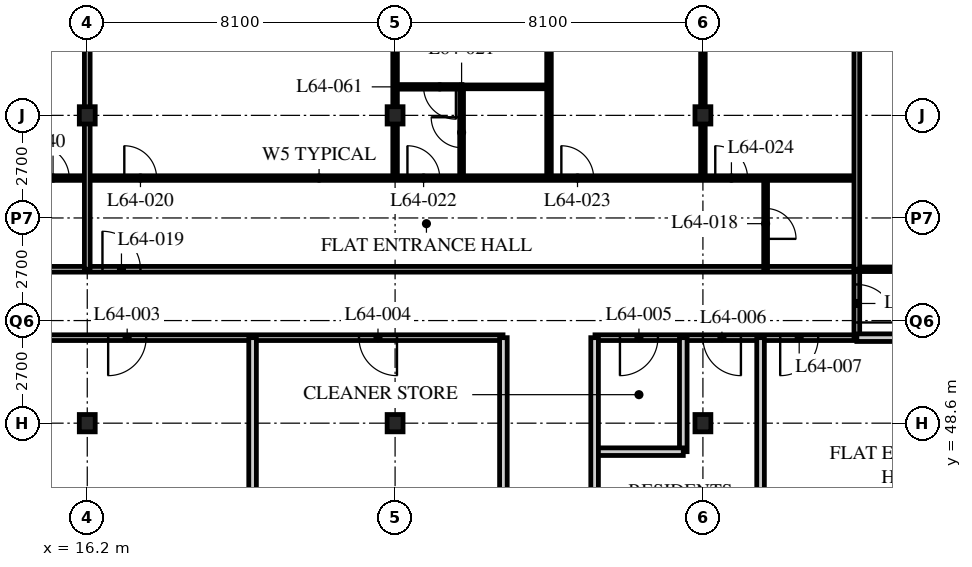
"""IFC4 building model, lengths in metres.
Left out: names, types, materials, properties, quantities, classifications, styles, units other than length and angle.
Written with IfcOpenShell. Run it as: python <this file> out.ifc"""

import sys

from ifc_helpers import new_model, si_unit, direction, frame, frame_2d, origin, origin_2d, place, context, subcontext, project, spatial, rectangle, i_section, extrude, element, fill, save


model = new_model("IFC4")
c1 = context("Model", 3, precision=1e-05, world=origin(), true_north=direction((0.0, 1.0)))
c2 = subcontext(c1, "Body", "Model", "MODEL_VIEW")
j1 = project(units=[si_unit("LENGTHUNIT", "METRE"), si_unit("PLANEANGLEUNIT", "RADIAN")], contexts=[c1])
p1 = place(None, origin())
s1 = spatial("IfcSite", under=j1, at=p1, CompositionType="ELEMENT")
p2 = place(p1, origin())
s2 = spatial("IfcBuilding", under=s1, at=p2, CompositionType="ELEMENT")
p3 = place(p2, frame((0.0, 0.0, 250.2)))
s3 = spatial("IfcBuildingStorey", under=s2, at=p3, CompositionType="ELEMENT", Elevation=250.2)
for number, where, z_axis, x_axis in (
    (1, (16.2, 48.6, 0.0), (0.0, 0.0, 1.0), (1.0, 0.0, 0.0)),
    (2, (16.2, 56.7, 0.0), (0.0, 0.0, 1.0), (1.0, 0.0, 0.0)),
    (3, (24.3, 48.6, 0.0), (0.0, 0.0, 1.0), (1.0, 0.0, 0.0)),
    (4, (24.3, 56.7, 0.0), (0.0, 0.0, 1.0), (1.0, 0.0, 0.0)),
    (5, (32.4, 48.6, 0.0), (0.0, 0.0, 1.0), (1.0, 0.0, 0.0)),
    (6, (32.4, 56.7, 0.0), (0.0, 0.0, 1.0), (1.0, 0.0, 0.0)),
):
    element("IfcColumn", number, at=place(p3, frame(where, z_axis=z_axis, x_axis=x_axis)), inside=s3, PredefinedType="COLUMN", context=c2, shape_type="SweptSolid", body=[
        extrude(i_section(OverallWidth=0.418, OverallDepth=0.456, WebThickness=0.042, FlangeThickness=0.067, FilletRadius=0.015, at=origin_2d()), origin(), (0.0, 0.0, 1.0), 3.9),
    ])
p4 = place(p3, frame((12.15, 52.65, 0.0), z_axis=(0.0, 0.0, 1.0), x_axis=(1.0, 0.0, 0.0)))
e7 = element("IfcWall", 7, at=p4, inside=s3, PredefinedType="PARTITIONING", context=c2, shape_type="SweptSolid", body=[
    extrude(rectangle(XDim=24.3, YDim=0.15, at=frame_2d((12.15, 0.0))), origin(), (0.0, 0.0, 1.0), 3.69),
])
p5 = place(p4, frame((4.45, 0.0, 0.0)))
e8 = element("IfcOpeningElement", 8, at=p5, cuts=e7, PredefinedType="OPENING", context=c2, shape_type="SweptSolid", body=[
    extrude(rectangle(XDim=1.0, YDim=2.1, at=frame_2d((0.5, 1.05))), frame((0.0, 0.085, 0.0), z_axis=(0.0, -1.0, 0.0), x_axis=(1.0, 0.0, 0.0)), (0.0, 0.0, 1.0), 0.17),
])
p6 = place(p4, frame((1.525, 0.0, 0.0)))
e9 = element("IfcOpeningElement", 9, at=p6, cuts=e7, PredefinedType="OPENING", context=c2, shape_type="SweptSolid", body=[
    extrude(rectangle(XDim=1.0, YDim=2.1, at=frame_2d((0.5, 1.05))), frame((0.0, 0.085, 0.0), z_axis=(0.0, -1.0, 0.0), x_axis=(1.0, 0.0, 0.0)), (0.0, 0.0, 1.0), 0.17),
])
p7 = place(p3, frame((13.95, 50.85, 0.0), z_axis=(0.0, 0.0, 1.0), x_axis=(1.0, 0.0, 0.0)))
e10 = element("IfcWall", 10, at=p7, inside=s3, PredefinedType="PARTITIONING", context=c2, shape_type="SweptSolid", body=[
    extrude(rectangle(XDim=13.19, YDim=0.15, at=frame_2d((6.595, 0.0))), origin(), (0.0, 0.0, 1.0), 3.69),
])
p8 = place(p7, frame((2.8, 0.0, 0.0)))
e11 = element("IfcOpeningElement", 11, at=p8, cuts=e10, PredefinedType="OPENING", context=c2, shape_type="SweptSolid", body=[
    extrude(rectangle(XDim=1.0, YDim=2.1, at=frame_2d((0.5, 1.05))), frame((0.0, 0.085, 0.0), z_axis=(0.0, -1.0, 0.0), x_axis=(1.0, 0.0, 0.0)), (0.0, 0.0, 1.0), 0.17),
])
p9 = place(p7, frame((9.4, 0.0, 0.0)))
e12 = element("IfcOpeningElement", 12, at=p9, cuts=e10, PredefinedType="OPENING", context=c2, shape_type="SweptSolid", body=[
    extrude(rectangle(XDim=1.0, YDim=2.1, at=frame_2d((0.5, 1.05))), frame((0.0, 0.085, 0.0), z_axis=(0.0, -1.0, 0.0), x_axis=(1.0, 0.0, 0.0)), (0.0, 0.0, 1.0), 0.17),
])
p10 = place(p3, frame((29.56, 50.85, 0.0), z_axis=(0.0, 0.0, 1.0), x_axis=(1.0, 0.0, 0.0)))
e13 = element("IfcWall", 13, at=p10, inside=s3, PredefinedType="PARTITIONING", context=c2, shape_type="SweptSolid", body=[
    extrude(rectangle(XDim=6.89, YDim=0.15, at=frame_2d((3.445, 0.0))), origin(), (0.0, 0.0, 1.0), 3.69),
])
p11 = place(p10, frame((0.657, 0.0, 0.0)))
e14 = element("IfcOpeningElement", 14, at=p11, cuts=e13, PredefinedType="OPENING", context=c2, shape_type="SweptSolid", body=[
    extrude(rectangle(XDim=1.0, YDim=2.1, at=frame_2d((0.5, 1.05))), frame((0.0, 0.085, 0.0), z_axis=(0.0, -1.0, 0.0), x_axis=(1.0, 0.0, 0.0)), (0.0, 0.0, 1.0), 0.17),
])
p12 = place(p10, frame((2.84, 0.0, 0.0)))
e15 = element("IfcOpeningElement", 15, at=p12, cuts=e13, PredefinedType="OPENING", context=c2, shape_type="SweptSolid", body=[
    extrude(rectangle(XDim=1.0, YDim=2.1, at=frame_2d((0.5, 1.05))), frame((0.0, 0.085, 0.0), z_axis=(0.0, -1.0, 0.0), x_axis=(1.0, 0.0, 0.0)), (0.0, 0.0, 1.0), 0.17),
])
p13 = place(p10, frame((4.873, 0.0, 0.0)))
e16 = element("IfcOpeningElement", 16, at=p13, cuts=e13, PredefinedType="OPENING", context=c2, shape_type="SweptSolid", body=[
    extrude(rectangle(XDim=1.0, YDim=2.1, at=frame_2d((0.5, 1.05))), frame((0.0, 0.085, 0.0), z_axis=(0.0, -1.0, 0.0), x_axis=(1.0, 0.0, 0.0)), (0.0, 0.0, 1.0), 0.17),
])
p14 = place(p3, frame((20.55, 50.85, 0.0), z_axis=(0.0, 0.0, 1.0), x_axis=(0.0, -1.0, 0.0)))
e17 = element("IfcWall", 17, at=p14, inside=s3, PredefinedType="SOLIDWALL", context=c2, shape_type="SweptSolid", body=[
    extrude(rectangle(XDim=10.35, YDim=0.2, at=frame_2d((5.175, 0.0))), origin(), (0.0, 0.0, 1.0), 3.69),
])
p15 = place(p3, frame((31.883, 50.85, 0.0), z_axis=(0.0, 0.0, 1.0), x_axis=(0.0, -1.0, 0.0)))
e18 = element("IfcWall", 18, at=p15, inside=s3, PredefinedType="SOLIDWALL", context=c2, shape_type="SweptSolid", body=[
    extrude(rectangle(XDim=3.0, YDim=0.2, at=frame_2d((1.5, 0.0))), origin(), (0.0, 0.0, 1.0), 3.69),
])
p16 = place(p3, frame((29.55, 47.85, 0.0), z_axis=(0.0, 0.0, 1.0), x_axis=(1.0, 0.0, 0.0)))
e19 = element("IfcWall", 19, at=p16, inside=s3, PredefinedType="SOLIDWALL", context=c2, shape_type="SweptSolid", body=[
    extrude(rectangle(XDim=2.333, YDim=0.2, at=frame_2d((1.167, 0.0))), origin(), (0.0, 0.0, 1.0), 3.69),
])
for number, where, z_axis, x_axis in (
    (20, (33.917, 50.85, 0.0), (0.0, 0.0, 1.0), (0.0, -1.0, 0.0)),
    (21, (27.15, 40.5, 0.0), (0.0, 0.0, 1.0), (0.0, 1.0, 0.0)),
    (22, (29.55, 40.5, 0.0), (0.0, 0.0, 1.0), (0.0, 1.0, 0.0)),
):
    element("IfcWall", number, at=place(p3, frame(where, z_axis=z_axis, x_axis=x_axis)), inside=s3, PredefinedType="SOLIDWALL", context=c2, shape_type="SweptSolid", body=[
        extrude(rectangle(XDim=10.35, YDim=0.2, at=frame_2d((5.175, 0.0))), origin(), (0.0, 0.0, 1.0), 3.69),
    ])
p17 = place(p3, frame((36.45, 50.85, 0.0), z_axis=(0.0, 0.0, 1.0), x_axis=(0.0, 1.0, 0.0)))
e23 = element("IfcWall", 23, at=p17, inside=s3, PredefinedType="PARTITIONING", context=c2, shape_type="SweptSolid", body=[
    extrude(rectangle(XDim=1.8, YDim=0.15, at=frame_2d((0.9, 0.0))), origin(), (0.0, 0.0, 1.0), 3.69),
])
p18 = place(p17, frame((0.4, 0.0, 0.0)))
e24 = element("IfcOpeningElement", 24, at=p18, cuts=e23, PredefinedType="OPENING", context=c2, shape_type="SweptSolid", body=[
    extrude(rectangle(XDim=1.0, YDim=2.1, at=frame_2d((0.5, 1.05))), frame((0.0, 0.085, 0.0), z_axis=(0.0, -1.0, 0.0), x_axis=(1.0, 0.0, 0.0)), (0.0, 0.0, 1.0), 0.17),
])
p19 = place(p3, frame((34.05, 52.65, 0.0), z_axis=(0.0, 0.0, 1.0), x_axis=(0.0, 1.0, 0.0)))
e25 = element("IfcWall", 25, at=p19, inside=s3, PredefinedType="PARTITIONING", context=c2, shape_type="SweptSolid", body=[
    extrude(rectangle(XDim=2.4, YDim=0.1, at=frame_2d((1.2, 0.0))), origin(), (0.0, 0.0, 1.0), 3.69),
])
p20 = place(p19, frame((0.8, 0.0, 0.0)))
e26 = element("IfcOpeningElement", 26, at=p20, cuts=e25, PredefinedType="OPENING", context=c2, shape_type="SweptSolid", body=[
    extrude(rectangle(XDim=0.8, YDim=2.1, at=frame_2d((0.4, 1.05))), frame((0.0, 0.06, 0.0), z_axis=(0.0, -1.0, 0.0), x_axis=(1.0, 0.0, 0.0)), (0.0, 0.0, 1.0), 0.12),
])
p21 = place(p3, frame((26.05, 55.05, 0.0), z_axis=(0.0, 0.0, 1.0), x_axis=(0.0, 1.0, 0.0)))
e27 = element("IfcWall", 27, at=p21, inside=s3, PredefinedType="PARTITIONING", context=c2, shape_type="SweptSolid", body=[
    extrude(rectangle(XDim=2.4, YDim=0.1, at=frame_2d((1.2, 0.0))), origin(), (0.0, 0.0, 1.0), 3.69),
])
p22 = place(p21, frame((0.8, 0.0, 0.0)))
e28 = element("IfcOpeningElement", 28, at=p22, cuts=e27, PredefinedType="OPENING", context=c2, shape_type="SweptSolid", body=[
    extrude(rectangle(XDim=0.8, YDim=2.1, at=frame_2d((0.4, 1.05))), frame((0.0, 0.06, 0.0), z_axis=(0.0, -1.0, 0.0), x_axis=(1.0, 0.0, 0.0)), (0.0, 0.0, 1.0), 0.12),
])
p23 = place(p3, frame((26.05, 57.45, 0.0), z_axis=(0.0, 0.0, 1.0), x_axis=(1.0, 0.0, 0.0)))
e29 = element("IfcWall", 29, at=p23, inside=s3, PredefinedType="PARTITIONING", context=c2, shape_type="SweptSolid", body=[
    extrude(rectangle(XDim=2.3, YDim=0.1, at=frame_2d((1.15, 0.0))), origin(), (0.0, 0.0, 1.0), 3.69),
])
p24 = place(p3, frame((24.3, 55.05, 0.0), z_axis=(0.0, 0.0, 1.0), x_axis=(0.0, 1.0, 0.0)))
e30 = element("IfcWall", 30, at=p24, inside=s3, PredefinedType="PARTITIONING", context=c2, shape_type="SweptSolid", body=[
    extrude(rectangle(XDim=9.45, YDim=0.12, at=frame_2d((4.725, 0.0))), origin(), (0.0, 0.0, 1.0), 3.078),
])
p25 = place(p3, frame((28.35, 55.05, 0.0), z_axis=(0.0, 0.0, 1.0), x_axis=(0.0, 1.0, 0.0)))
e31 = element("IfcWall", 31, at=p25, inside=s3, PredefinedType="PARTITIONING", context=c2, shape_type="SweptSolid", body=[
    extrude(rectangle(XDim=9.45, YDim=0.12, at=frame_2d((4.725, 0.0))), origin(), (0.0, 0.0, 1.0), 3.69),
])
p26 = place(p3, frame((32.4, 55.05, 0.0), z_axis=(0.0, 0.0, 1.0), x_axis=(0.0, 1.0, 0.0)))
e32 = element("IfcWall", 32, at=p26, inside=s3, PredefinedType="PARTITIONING", context=c2, shape_type="SweptSolid", body=[
    extrude(rectangle(XDim=9.45, YDim=0.12, at=frame_2d((4.725, 0.0))), origin(), (0.0, 0.0, 1.0), 3.078),
])
p27 = place(p3, frame((8.15, 55.05, 0.0), z_axis=(0.0, 0.0, 1.0), x_axis=(1.0, 0.0, 0.0)))
e33 = element("IfcWall", 33, at=p27, inside=s3, PredefinedType="PARTITIONING", context=c2, shape_type="SweptSolid", body=[
    extrude(rectangle(XDim=28.3, YDim=0.12, at=frame_2d((14.15, 0.0))), origin(), (0.0, 0.0, 1.0), 3.69),
])
p28 = place(p27, frame((9.025, 0.0, 0.0)))
e34 = element("IfcOpeningElement", 34, at=p28, cuts=e33, PredefinedType="OPENING", context=c2, shape_type="SweptSolid", body=[
    extrude(rectangle(XDim=0.85, YDim=2.1, at=frame_2d((0.425, 1.05))), frame((0.0, 0.07, 0.0), z_axis=(0.0, -1.0, 0.0), x_axis=(1.0, 0.0, 0.0)), (0.0, 0.0, 1.0), 0.14),
])
p29 = place(p27, frame((16.475, 0.0, 0.0)))
e35 = element("IfcOpeningElement", 35, at=p29, cuts=e33, PredefinedType="OPENING", context=c2, shape_type="SweptSolid", body=[
    extrude(rectangle(XDim=0.85, YDim=2.1, at=frame_2d((0.425, 1.05))), frame((0.0, 0.07, 0.0), z_axis=(0.0, -1.0, 0.0), x_axis=(1.0, 0.0, 0.0)), (0.0, 0.0, 1.0), 0.14),
])
p30 = place(p27, frame((20.525, 0.0, 0.0)))
e36 = element("IfcOpeningElement", 36, at=p30, cuts=e33, PredefinedType="OPENING", context=c2, shape_type="SweptSolid", body=[
    extrude(rectangle(XDim=0.85, YDim=2.1, at=frame_2d((0.425, 1.05))), frame((0.0, 0.07, 0.0), z_axis=(0.0, -1.0, 0.0), x_axis=(1.0, 0.0, 0.0)), (0.0, 0.0, 1.0), 0.14),
])
p31 = place(p27, frame((24.575, 0.0, 0.0)))
e37 = element("IfcOpeningElement", 37, at=p31, cuts=e33, PredefinedType="OPENING", context=c2, shape_type="SweptSolid", body=[
    extrude(rectangle(XDim=0.85, YDim=2.1, at=frame_2d((0.425, 1.05))), frame((0.0, 0.07, 0.0), z_axis=(0.0, -1.0, 0.0), x_axis=(1.0, 0.0, 0.0)), (0.0, 0.0, 1.0), 0.14),
])
p32 = place(p27, frame((6.725, 0.0, 0.0)))
e38 = element("IfcOpeningElement", 38, at=p32, cuts=e33, PredefinedType="OPENING", context=c2, shape_type="SweptSolid", body=[
    extrude(rectangle(XDim=0.85, YDim=2.1, at=frame_2d((0.425, 1.05))), frame((0.0, 0.07, 0.0), z_axis=(0.0, -1.0, 0.0), x_axis=(1.0, 0.0, 0.0)), (0.0, 0.0, 1.0), 0.14),
])
p33 = place(p27, frame((2.875, 0.0, 0.0)))
e39 = element("IfcOpeningElement", 39, at=p33, cuts=e33, PredefinedType="OPENING", context=c2, shape_type="SweptSolid", body=[
    extrude(rectangle(XDim=0.85, YDim=2.1, at=frame_2d((0.425, 1.05))), frame((0.0, 0.07, 0.0), z_axis=(0.0, -1.0, 0.0), x_axis=(1.0, 0.0, 0.0)), (0.0, 0.0, 1.0), 0.14),
])
p34 = place(p3, frame((16.2, 52.65, 0.0), z_axis=(0.0, 0.0, 1.0), x_axis=(0.0, 1.0, 0.0)))
e40 = element("IfcWall", 40, at=p34, inside=s3, PredefinedType="PARTITIONING", context=c2, shape_type="SweptSolid", body=[
    extrude(rectangle(XDim=11.85, YDim=0.15, at=frame_2d((5.925, 0.0))), origin(), (0.0, 0.0, 1.0), 3.078),
])
p35 = place(p3, frame((36.45, 52.65, 0.0), z_axis=(0.0, 0.0, 1.0), x_axis=(1.0, 0.0, 0.0)))
e41 = element("IfcWall", 41, at=p35, inside=s3, PredefinedType="PARTITIONING", context=c2, shape_type="SweptSolid", body=[
    extrude(rectangle(XDim=6.45, YDim=0.12, at=frame_2d((3.225, 0.0))), origin(), (0.0, 0.0, 1.0), 3.69),
])
p36 = place(p35, frame((2.8, 0.0, 0.0)))
e42 = element("IfcOpeningElement", 42, at=p36, cuts=e41, PredefinedType="OPENING", context=c2, shape_type="SweptSolid", body=[
    extrude(rectangle(XDim=0.85, YDim=2.1, at=frame_2d((0.425, 1.05))), frame((0.0, 0.07, 0.0), z_axis=(0.0, -1.0, 0.0), x_axis=(1.0, 0.0, 0.0)), (0.0, 0.0, 1.0), 0.14),
])
p37 = place(p3, frame((36.45, 50.85, 0.0), z_axis=(0.0, 0.0, 1.0), x_axis=(1.0, 0.0, 0.0)))
e43 = element("IfcWall", 43, at=p37, inside=s3, PredefinedType="SOLIDWALL", context=c2, shape_type="SweptSolid", body=[
    extrude(rectangle(XDim=4.05, YDim=0.2, at=frame_2d((2.025, 0.0))), origin(), (0.0, 0.0, 1.0), 3.69),
])
p38 = place(p3, frame((36.45, 64.5, 0.0), z_axis=(0.0, 0.0, 1.0), x_axis=(0.0, -1.0, 0.0)))
e44 = element("IfcWall", 44, at=p38, inside=s3, PredefinedType="PARTITIONING", context=c2, shape_type="SweptSolid", body=[
    extrude(rectangle(XDim=11.85, YDim=0.15, at=frame_2d((5.925, 0.0))), origin(), (0.0, 0.0, 1.0), 3.69),
])
p39 = place(p3, frame((24.3, 57.45, 0.0), z_axis=(0.0, 0.0, 1.0), x_axis=(1.0, 0.0, 0.0)))
e45 = element("IfcWall", 45, at=p39, inside=s3, PredefinedType="PARTITIONING", context=c2, shape_type="SweptSolid", body=[
    extrude(rectangle(XDim=1.76, YDim=0.12, at=frame_2d((0.88, 0.0))), origin(), (0.0, 0.0, 1.0), 3.69),
])
p40 = place(p39, frame((0.75, 0.0, 0.0)))
e46 = element("IfcOpeningElement", 46, at=p40, cuts=e45, PredefinedType="OPENING", context=c2, shape_type="SweptSolid", body=[
    extrude(rectangle(XDim=0.85, YDim=2.1, at=frame_2d((0.425, 1.05))), frame((0.0, 0.07, 0.0), z_axis=(0.0, -1.0, 0.0), x_axis=(1.0, 0.0, 0.0)), (0.0, 0.0, 1.0), 0.14),
])
p41 = place(p8, origin())
e47 = element("IfcDoor", 47, at=p41, inside=s3, OperationType="SINGLE_SWING_RIGHT", PredefinedType="DOOR", context=c2, shape_type="SweptSolid", body=[
    extrude(rectangle(XDim=1.0, YDim=2.1, at=frame_2d((0.5, 1.05))), frame((0.0, 0.025, 0.0), z_axis=(0.0, -1.0, 0.0), x_axis=(1.0, 0.0, 0.0)), (0.0, 0.0, 1.0), 0.05),
])
fill(e11, e47)
p42 = place(p9, origin())
e48 = element("IfcDoor", 48, at=p42, inside=s3, OperationType="SINGLE_SWING_LEFT", PredefinedType="DOOR", context=c2, shape_type="SweptSolid", body=[
    extrude(rectangle(XDim=1.0, YDim=2.1, at=frame_2d((0.5, 1.05))), frame((0.0, 0.025, 0.0), z_axis=(0.0, -1.0, 0.0), x_axis=(1.0, 0.0, 0.0)), (0.0, 0.0, 1.0), 0.05),
])
fill(e12, e48)
p43 = place(p11, origin())
e49 = element("IfcDoor", 49, at=p43, inside=s3, OperationType="SINGLE_SWING_RIGHT", PredefinedType="DOOR", context=c2, shape_type="SweptSolid", body=[
    extrude(rectangle(XDim=1.0, YDim=2.1, at=frame_2d((0.5, 1.05))), frame((0.0, 0.025, 0.0), z_axis=(0.0, -1.0, 0.0), x_axis=(1.0, 0.0, 0.0)), (0.0, 0.0, 1.0), 0.05),
])
fill(e14, e49)
p44 = place(p12, origin())
e50 = element("IfcDoor", 50, at=p44, inside=s3, OperationType="SINGLE_SWING_LEFT", PredefinedType="DOOR", context=c2, shape_type="SweptSolid", body=[
    extrude(rectangle(XDim=1.0, YDim=2.1, at=frame_2d((0.5, 1.05))), frame((0.0, 0.025, 0.0), z_axis=(0.0, -1.0, 0.0), x_axis=(1.0, 0.0, 0.0)), (0.0, 0.0, 1.0), 0.05),
])
fill(e15, e50)
p45 = place(p13, origin())
e51 = element("IfcDoor", 51, at=p45, inside=s3, OperationType="SINGLE_SWING_RIGHT", PredefinedType="DOOR", context=c2, shape_type="SweptSolid", body=[
    extrude(rectangle(XDim=1.0, YDim=2.1, at=frame_2d((0.5, 1.05))), frame((0.0, 0.025, 0.0), z_axis=(0.0, -1.0, 0.0), x_axis=(1.0, 0.0, 0.0)), (0.0, 0.0, 1.0), 0.05),
])
fill(e16, e51)
p46 = place(p20, origin())
e52 = element("IfcDoor", 52, at=p46, inside=s3, OperationType="SINGLE_SWING_RIGHT", PredefinedType="DOOR", context=c2, shape_type="SweptSolid", body=[
    extrude(rectangle(XDim=0.8, YDim=2.1, at=frame_2d((0.4, 1.05))), frame((0.0, 0.025, 0.0), z_axis=(0.0, -1.0, 0.0), x_axis=(1.0, 0.0, 0.0)), (0.0, 0.0, 1.0), 0.05),
])
fill(e26, e52)
p47 = place(p5, origin())
e53 = element("IfcDoor", 53, at=p47, inside=s3, OperationType="SINGLE_SWING_LEFT", PredefinedType="DOOR", context=c2, shape_type="SweptSolid", body=[
    extrude(rectangle(XDim=1.0, YDim=2.1, at=frame_2d((0.5, 1.05))), frame((0.0, 0.025, 0.0), z_axis=(0.0, -1.0, 0.0), x_axis=(1.0, 0.0, 0.0)), (0.0, 0.0, 1.0), 0.05),
])
fill(e8, e53)
p48 = place(p28, origin())
e54 = element("IfcDoor", 54, at=p48, inside=s3, OperationType="SINGLE_SWING_LEFT", PredefinedType="DOOR", context=c2, shape_type="SweptSolid", body=[
    extrude(rectangle(XDim=0.85, YDim=2.1, at=frame_2d((0.425, 1.05))), frame((0.0, 0.025, 0.0), z_axis=(0.0, -1.0, 0.0), x_axis=(1.0, 0.0, 0.0)), (0.0, 0.0, 1.0), 0.05),
])
fill(e34, e54)
p49 = place(p22, origin())
e55 = element("IfcDoor", 55, at=p49, inside=s3, OperationType="SINGLE_SWING_RIGHT", PredefinedType="DOOR", context=c2, shape_type="SweptSolid", body=[
    extrude(rectangle(XDim=0.8, YDim=2.1, at=frame_2d((0.4, 1.05))), frame((0.0, 0.025, 0.0), z_axis=(0.0, -1.0, 0.0), x_axis=(1.0, 0.0, 0.0)), (0.0, 0.0, 1.0), 0.05),
])
fill(e28, e55)
p50 = place(p29, origin())
e56 = element("IfcDoor", 56, at=p50, inside=s3, OperationType="SINGLE_SWING_LEFT", PredefinedType="DOOR", context=c2, shape_type="SweptSolid", body=[
    extrude(rectangle(XDim=0.85, YDim=2.1, at=frame_2d((0.425, 1.05))), frame((0.0, 0.025, 0.0), z_axis=(0.0, -1.0, 0.0), x_axis=(1.0, 0.0, 0.0)), (0.0, 0.0, 1.0), 0.05),
])
fill(e35, e56)
p51 = place(p30, origin())
e57 = element("IfcDoor", 57, at=p51, inside=s3, OperationType="SINGLE_SWING_LEFT", PredefinedType="DOOR", context=c2, shape_type="SweptSolid", body=[
    extrude(rectangle(XDim=0.85, YDim=2.1, at=frame_2d((0.425, 1.05))), frame((0.0, 0.025, 0.0), z_axis=(0.0, -1.0, 0.0), x_axis=(1.0, 0.0, 0.0)), (0.0, 0.0, 1.0), 0.05),
])
fill(e36, e57)
p52 = place(p31, origin())
e58 = element("IfcDoor", 58, at=p52, inside=s3, OperationType="SINGLE_SWING_LEFT", PredefinedType="DOOR", context=c2, shape_type="SweptSolid", body=[
    extrude(rectangle(XDim=0.85, YDim=2.1, at=frame_2d((0.425, 1.05))), frame((0.0, 0.025, 0.0), z_axis=(0.0, -1.0, 0.0), x_axis=(1.0, 0.0, 0.0)), (0.0, 0.0, 1.0), 0.05),
])
fill(e37, e58)
p53 = place(p32, origin())
e59 = element("IfcDoor", 59, at=p53, inside=s3, OperationType="SINGLE_SWING_LEFT", PredefinedType="DOOR", context=c2, shape_type="SweptSolid", body=[
    extrude(rectangle(XDim=0.85, YDim=2.1, at=frame_2d((0.425, 1.05))), frame((0.0, 0.025, 0.0), z_axis=(0.0, -1.0, 0.0), x_axis=(1.0, 0.0, 0.0)), (0.0, 0.0, 1.0), 0.05),
])
fill(e38, e59)
p54 = place(p18, origin())
e60 = element("IfcDoor", 60, at=p54, inside=s3, OperationType="SINGLE_SWING_RIGHT", PredefinedType="DOOR", context=c2, shape_type="SweptSolid", body=[
    extrude(rectangle(XDim=1.0, YDim=2.1, at=frame_2d((0.5, 1.05))), frame((0.0, 0.025, 0.0), z_axis=(0.0, -1.0, 0.0), x_axis=(1.0, 0.0, 0.0)), (0.0, 0.0, 1.0), 0.05),
])
fill(e24, e60)
p55 = place(p40, origin())
e61 = element("IfcDoor", 61, at=p55, inside=s3, OperationType="SINGLE_SWING_LEFT", PredefinedType="DOOR", context=c2, shape_type="SweptSolid", body=[
    extrude(rectangle(XDim=0.85, YDim=2.1, at=frame_2d((0.425, 1.05))), frame((0.0, 0.025, 0.0), z_axis=(0.0, -1.0, 0.0), x_axis=(1.0, 0.0, 0.0)), (0.0, 0.0, 1.0), 0.05),
])
fill(e46, e61)
save(model, sys.argv[1])
